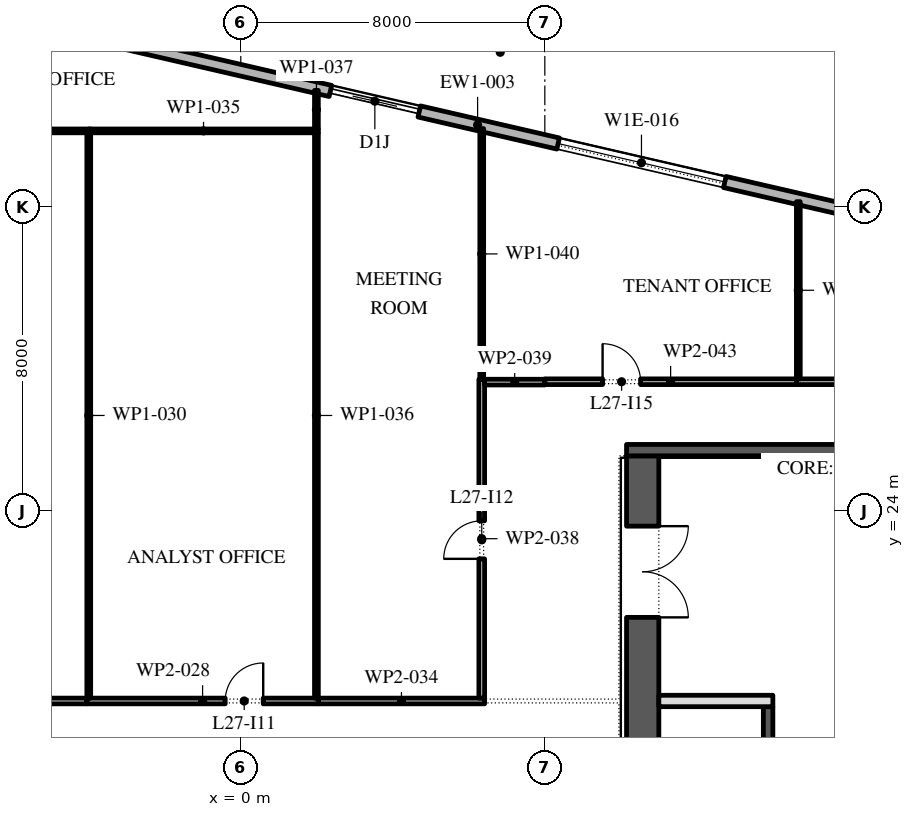
"""IFC4 building model, lengths in metres.
Left out: names, types, materials, properties, quantities, classifications, styles, units other than length and angle.
Written with IfcOpenShell. Run it as: python <this file> out.ifc"""

import sys

from ifc_helpers import new_model, si_unit, direction, frame, frame_2d, origin, place, context, subcontext, project, spatial, rectangle, extrude, element, fill, save


model = new_model("IFC4")
c1 = context("Model", 3, precision=1e-05, world=origin(), true_north=direction((0.0, 1.0)))
c2 = subcontext(c1, "Body", "Model", "MODEL_VIEW")
j1 = project(units=[si_unit("LENGTHUNIT", "METRE"), si_unit("PLANEANGLEUNIT", "RADIAN")], contexts=[c1])
p1 = place(None, origin())
s1 = spatial("IfcSite", under=j1, at=p1, CompositionType="ELEMENT")
p2 = place(p1, origin())
s2 = spatial("IfcBuilding", under=s1, at=p2, CompositionType="ELEMENT")
p3 = place(p2, frame((0.0, 0.0, 126.6)))
s3 = spatial("IfcBuildingStorey", under=s2, at=p3, CompositionType="ELEMENT", Elevation=126.6)
p4 = place(p3, frame((31.078, 28.421, 0.0), z_axis=(0.0, 0.0, 1.0), x_axis=(-0.974370456532, 0.224949357493, 0.0)))
e1 = element("IfcWall", 1, at=p4, inside=s3, PredefinedType="STANDARD", context=c2, shape_type="SweptSolid", body=[
    extrude(rectangle(XDim=51.0, YDim=0.3, at=frame_2d((25.5, 0.0))), origin(), (0.0, 0.0, 1.0), 4.0),
])
p5 = place(p4, frame((1.875, 0.0, 0.45)))
e2 = element("IfcOpeningElement", 2, at=p5, cuts=e1, PredefinedType="OPENING", context=c2, shape_type="SweptSolid", body=[
    extrude(rectangle(XDim=4.5, YDim=2.95, at=frame_2d((2.25, 1.475))), frame((0.0, 0.16, 0.0), z_axis=(0.0, -1.0, 0.0), x_axis=(1.0, 0.0, 0.0)), (0.0, 0.0, 1.0), 0.32),
])
p6 = place(p4, frame((10.275, 0.0, 0.45)))
e3 = element("IfcOpeningElement", 3, at=p6, cuts=e1, PredefinedType="OPENING", context=c2, shape_type="SweptSolid", body=[
    extrude(rectangle(XDim=4.5, YDim=2.875, at=frame_2d((2.25, 1.438))), frame((0.0, 0.16, 0.0), z_axis=(0.0, -1.0, 0.0), x_axis=(1.0, 0.0, 0.0)), (0.0, 0.0, 1.0), 0.32),
])
p7 = place(p4, frame((18.825, 0.0, 0.45)))
e4 = element("IfcOpeningElement", 4, at=p7, cuts=e1, PredefinedType="OPENING", context=c2, shape_type="SweptSolid", body=[
    extrude(rectangle(XDim=4.5, YDim=2.825, at=frame_2d((2.25, 1.413))), frame((0.0, 0.16, 0.0), z_axis=(0.0, -1.0, 0.0), x_axis=(1.0, 0.0, 0.0)), (0.0, 0.0, 1.0), 0.32),
])
p8 = place(p4, frame((27.075, 0.0, 0.0)))
e5 = element("IfcOpeningElement", 5, at=p8, cuts=e1, PredefinedType="OPENING", context=c2, shape_type="SweptSolid", body=[
    extrude(rectangle(XDim=2.4, YDim=3.125, at=frame_2d((1.2, 1.562))), frame((0.0, 0.16, 0.0), z_axis=(0.0, -1.0, 0.0), x_axis=(1.0, 0.0, 0.0)), (0.0, 0.0, 1.0), 0.32),
])
p9 = place(p4, frame((35.925, 0.0, 0.45)))
e6 = element("IfcOpeningElement", 6, at=p9, cuts=e1, PredefinedType="OPENING", context=c2, shape_type="SweptSolid", body=[
    extrude(rectangle(XDim=4.5, YDim=2.575, at=frame_2d((2.25, 1.288))), frame((0.0, 0.16, 0.0), z_axis=(0.0, -1.0, 0.0), x_axis=(1.0, 0.0, 0.0)), (0.0, 0.0, 1.0), 0.32),
])
p10 = place(p4, frame((44.475, 0.0, 0.45)))
e7 = element("IfcOpeningElement", 7, at=p10, cuts=e1, PredefinedType="OPENING", context=c2, shape_type="SweptSolid", body=[
    extrude(rectangle(XDim=4.5, YDim=3.05, at=frame_2d((2.25, 1.525))), frame((0.0, 0.16, 0.0), z_axis=(0.0, -1.0, 0.0), x_axis=(1.0, 0.0, 0.0)), (0.0, 0.0, 1.0), 0.32),
])
p11 = place(p3, frame((10.575, -2.45, 0.0), z_axis=(0.0, 0.0, 1.0), x_axis=(0.0, 1.0, 0.0)))
e8 = element("IfcWall", 8, at=p11, inside=s3, PredefinedType="SHEAR", context=c2, shape_type="SweptSolid", body=[
    extrude(rectangle(XDim=27.9, YDim=0.85, at=frame_2d((13.95, 0.0))), origin(), (0.0, 0.0, 1.0), 4.0),
])
p12 = place(p11, frame((23.65, 0.0, 0.0)))
e9 = element("IfcOpeningElement", 9, at=p12, cuts=e8, PredefinedType="OPENING", context=c2, shape_type="SweptSolid", body=[
    extrude(rectangle(XDim=2.4, YDim=2.1, at=frame_2d((1.2, 1.05))), frame((0.0, 0.435, 0.0), z_axis=(0.0, -1.0, 0.0), x_axis=(1.0, 0.0, 0.0)), (0.0, 0.0, 1.0), 0.87),
])
p13 = place(p11, frame((0.788, 0.0, 0.0)))
e10 = element("IfcOpeningElement", 10, at=p13, cuts=e8, PredefinedType="OPENING", context=c2, shape_type="SweptSolid", body=[
    extrude(rectangle(XDim=0.9, YDim=2.1, at=frame_2d((0.45, 1.05))), frame((0.0, 0.435, 0.0), z_axis=(0.0, -1.0, 0.0), x_axis=(1.0, 0.0, 0.0)), (0.0, 0.0, 1.0), 0.87),
])
p14 = place(p11, frame((3.962, 0.0, 0.0)))
e11 = element("IfcOpeningElement", 11, at=p14, cuts=e8, PredefinedType="OPENING", context=c2, shape_type="SweptSolid", body=[
    extrude(rectangle(XDim=1.0, YDim=2.1, at=frame_2d((0.5, 1.05))), frame((0.0, 0.435, 0.0), z_axis=(0.0, -1.0, 0.0), x_axis=(1.0, 0.0, 0.0)), (0.0, 0.0, 1.0), 0.87),
])
p15 = place(p3, frame((10.15, 25.6, 0.0), z_axis=(0.0, 0.0, 1.0), x_axis=(1.0, 0.0, 0.0)))
e12 = element("IfcWall", 12, at=p15, inside=s3, PredefinedType="SHEAR", context=c2, shape_type="SweptSolid", body=[
    extrude(rectangle(XDim=11.7, YDim=0.3, at=frame_2d((5.85, 0.0))), origin(), (0.0, 0.0, 1.0), 4.0),
])
p16 = place(p3, frame((13.875, -2.45, 0.0), z_axis=(0.0, 0.0, 1.0), x_axis=(0.0, 1.0, 0.0)))
e13 = element("IfcWall", 13, at=p16, inside=s3, PredefinedType="SHEAR", context=c2, shape_type="SweptSolid", body=[
    extrude(rectangle(XDim=21.3, YDim=0.25, at=frame_2d((10.65, 0.0))), origin(), (0.0, 0.0, 1.0), 4.0),
])
p17 = place(p16, frame((10.396, 0.0, 0.0)))
e14 = element("IfcOpeningElement", 14, at=p17, cuts=e13, PredefinedType="OPENING", context=c2, shape_type="SweptSolid", body=[
    extrude(rectangle(XDim=0.9, YDim=2.1, at=frame_2d((0.45, 1.05))), frame((0.0, 0.135, 0.0), z_axis=(0.0, -1.0, 0.0), x_axis=(1.0, 0.0, 0.0)), (0.0, 0.0, 1.0), 0.27),
])
p18 = place(p16, frame((14.6, 0.0, 0.0)))
e15 = element("IfcOpeningElement", 15, at=p18, cuts=e13, PredefinedType="OPENING", context=c2, shape_type="SweptSolid", body=[
    extrude(rectangle(XDim=0.9, YDim=2.1, at=frame_2d((0.45, 1.05))), frame((0.0, 0.135, 0.0), z_axis=(0.0, -1.0, 0.0), x_axis=(1.0, 0.0, 0.0)), (0.0, 0.0, 1.0), 0.27),
])
p19 = place(p16, frame((18.775, 0.0, 0.0)))
e16 = element("IfcOpeningElement", 16, at=p19, cuts=e13, PredefinedType="OPENING", context=c2, shape_type="SweptSolid", body=[
    extrude(rectangle(XDim=0.9, YDim=2.1, at=frame_2d((0.45, 1.05))), frame((0.0, 0.135, 0.0), z_axis=(0.0, -1.0, 0.0), x_axis=(1.0, 0.0, 0.0)), (0.0, 0.0, 1.0), 0.27),
])
p20 = place(p16, frame((6.971, 0.0, 0.0)))
e17 = element("IfcOpeningElement", 17, at=p20, cuts=e13, PredefinedType="OPENING", context=c2, shape_type="SweptSolid", body=[
    extrude(rectangle(XDim=1.1, YDim=2.1, at=frame_2d((0.55, 1.05))), frame((0.0, 0.135, 0.0), z_axis=(0.0, -1.0, 0.0), x_axis=(1.0, 0.0, 0.0)), (0.0, 0.0, 1.0), 0.27),
])
p21 = place(p3, frame((11.0, 19.0, 0.0), z_axis=(0.0, 0.0, 1.0), x_axis=(1.0, 0.0, 0.0)))
e18 = element("IfcWall", 18, at=p21, inside=s3, PredefinedType="PARTITIONING", context=c2, shape_type="SweptSolid", body=[
    extrude(rectangle(XDim=3.0, YDim=0.3, at=frame_2d((1.5, 0.0))), origin(), (0.0, 0.0, 1.0), 4.0),
])
p22 = place(p3, frame((-8.075, 19.0, 0.0), z_axis=(0.0, 0.0, 1.0), x_axis=(1.0, 0.0, 0.0)))
e19 = element("IfcWall", 19, at=p22, inside=s3, PredefinedType="PARTITIONING", context=c2, shape_type="SweptSolid", body=[
    extrude(rectangle(XDim=4.025, YDim=0.15, at=frame_2d((2.012, 0.0))), origin(), (0.0, 0.0, 1.0), 4.0),
])
p23 = place(p3, frame((-4.05, 19.0, 0.0), z_axis=(0.0, 0.0, 1.0), x_axis=(1.0, 0.0, 0.0)))
e20 = element("IfcWall", 20, at=p23, inside=s3, PredefinedType="PARTITIONING", context=c2, shape_type="SweptSolid", body=[
    extrude(rectangle(XDim=6.09, YDim=0.15, at=frame_2d((3.045, 0.0))), origin(), (0.0, 0.0, 1.0), 4.0),
])
p24 = place(p23, frame((3.64, 0.0, 0.0)))
e21 = element("IfcOpeningElement", 21, at=p24, cuts=e20, PredefinedType="OPENING", context=c2, shape_type="SweptSolid", body=[
    extrude(rectangle(XDim=1.0, YDim=2.1, at=frame_2d((0.5, 1.05))), frame((0.0, 0.085, 0.0), z_axis=(0.0, -1.0, 0.0), x_axis=(1.0, 0.0, 0.0)), (0.0, 0.0, 1.0), 0.17),
])
p25 = place(p3, frame((-3.95, 34.0, 0.0), z_axis=(0.0, 0.0, 1.0), x_axis=(-1.0, 0.0, 0.0)))
e22 = element("IfcWall", 22, at=p25, inside=s3, PredefinedType="PARTITIONING", context=c2, shape_type="SweptSolid", body=[
    extrude(rectangle(XDim=10.67, YDim=0.1, at=frame_2d((5.335, 0.0))), origin(), (0.0, 0.0, 1.0), 4.0),
])
p26 = place(p25, frame((7.0, 0.0, 0.0)))
e23 = element("IfcOpeningElement", 23, at=p26, cuts=e22, PredefinedType="OPENING", context=c2, shape_type="SweptSolid", body=[
    extrude(rectangle(XDim=0.9, YDim=2.1, at=frame_2d((0.45, 1.05))), frame((0.0, 0.06, 0.0), z_axis=(0.0, -1.0, 0.0), x_axis=(1.0, 0.0, 0.0)), (0.0, 0.0, 1.0), 0.12),
])
p27 = place(p3, frame((-4.0, 33.95, 0.0), z_axis=(0.0, 0.0, 1.0), x_axis=(0.0, -1.0, 0.0)))
e24 = element("IfcWall", 24, at=p27, inside=s3, PredefinedType="PARTITIONING", context=c2, shape_type="SweptSolid", body=[
    extrude(rectangle(XDim=14.875, YDim=0.1, at=frame_2d((7.438, 0.0))), origin(), (0.0, 0.0, 1.0), 4.0),
])
p28 = place(p3, frame((2.04, 19.0, 0.0), z_axis=(0.0, 0.0, 1.0), x_axis=(1.0, 0.0, 0.0)))
e25 = element("IfcWall", 25, at=p28, inside=s3, PredefinedType="PARTITIONING", context=c2, shape_type="SweptSolid", body=[
    extrude(rectangle(XDim=4.375, YDim=0.15, at=frame_2d((2.188, 0.0))), origin(), (0.0, 0.0, 1.0), 4.0),
])
p29 = place(p3, frame((2.04, 34.0, 0.0), z_axis=(0.0, 0.0, 1.0), x_axis=(-1.0, 0.0, 0.0)))
e26 = element("IfcWall", 26, at=p29, inside=s3, PredefinedType="PARTITIONING", context=c2, shape_type="SweptSolid", body=[
    extrude(rectangle(XDim=6.04, YDim=0.1, at=frame_2d((3.02, 0.0))), origin(), (0.0, 0.0, 1.0), 4.0),
])
p30 = place(p3, frame((1.99, 33.95, 0.0), z_axis=(0.0, 0.0, 1.0), x_axis=(0.0, -1.0, 0.0)))
e27 = element("IfcWall", 27, at=p30, inside=s3, PredefinedType="PARTITIONING", context=c2, shape_type="SweptSolid", body=[
    extrude(rectangle(XDim=14.875, YDim=0.1, at=frame_2d((7.438, 0.0))), origin(), (0.0, 0.0, 1.0), 4.0),
])
p31 = place(p3, frame((1.99, 35.065, 0.0), z_axis=(0.0, 0.0, 1.0), x_axis=(0.0, -1.0, 0.0)))
e28 = element("IfcWall", 28, at=p31, inside=s3, PredefinedType="PARTITIONING", context=c2, shape_type="SweptSolid", body=[
    extrude(rectangle(XDim=1.015, YDim=0.1, at=frame_2d((0.507, 0.0))), origin(), (0.0, 0.0, 1.0), 4.0),
])
p32 = place(p3, frame((6.34, 19.075, 0.0), z_axis=(0.0, 0.0, 1.0), x_axis=(0.0, 1.0, 0.0)))
e29 = element("IfcWall", 29, at=p32, inside=s3, PredefinedType="PARTITIONING", context=c2, shape_type="SweptSolid", body=[
    extrude(rectangle(XDim=8.39, YDim=0.15, at=frame_2d((4.195, 0.0))), origin(), (0.0, 0.0, 1.0), 4.0),
])
p33 = place(p32, frame((3.665, 0.0, 0.0)))
e30 = element("IfcOpeningElement", 30, at=p33, cuts=e29, PredefinedType="OPENING", context=c2, shape_type="SweptSolid", body=[
    extrude(rectangle(XDim=1.0, YDim=2.1, at=frame_2d((0.5, 1.05))), frame((0.0, 0.085, 0.0), z_axis=(0.0, -1.0, 0.0), x_axis=(1.0, 0.0, 0.0)), (0.0, 0.0, 1.0), 0.17),
])
p34 = place(p3, frame((6.415, 27.39, 0.0), z_axis=(0.0, 0.0, 1.0), x_axis=(1.0, 0.0, 0.0)))
e31 = element("IfcWall", 31, at=p34, inside=s3, PredefinedType="PARTITIONING", context=c2, shape_type="SweptSolid", body=[
    extrude(rectangle(XDim=1.585, YDim=0.15, at=frame_2d((0.792, 0.0))), origin(), (0.0, 0.0, 1.0), 4.0),
])
p35 = place(p3, frame((6.34, 34.061, 0.0), z_axis=(0.0, 0.0, 1.0), x_axis=(0.0, -1.0, 0.0)))
e32 = element("IfcWall", 32, at=p35, inside=s3, PredefinedType="PARTITIONING", context=c2, shape_type="SweptSolid", body=[
    extrude(rectangle(XDim=6.596, YDim=0.1, at=frame_2d((3.298, 0.0))), origin(), (0.0, 0.0, 1.0), 4.0),
])
p36 = place(p3, frame((8.0, 27.4, 0.0), z_axis=(0.0, 0.0, 1.0), x_axis=(1.0, 0.0, 0.0)))
e33 = element("IfcWall", 33, at=p36, inside=s3, PredefinedType="PARTITIONING", context=c2, shape_type="SweptSolid", body=[
    extrude(rectangle(XDim=6.62, YDim=0.15, at=frame_2d((3.31, 0.0))), origin(), (0.0, 0.0, 1.0), 4.0),
])
p37 = place(p36, frame((1.52, 0.0, 0.0)))
e34 = element("IfcOpeningElement", 34, at=p37, cuts=e33, PredefinedType="OPENING", context=c2, shape_type="SweptSolid", body=[
    extrude(rectangle(XDim=1.0, YDim=2.1, at=frame_2d((0.5, 1.05))), frame((0.0, 0.085, 0.0), z_axis=(0.0, -1.0, 0.0), x_axis=(1.0, 0.0, 0.0)), (0.0, 0.0, 1.0), 0.17),
])
p38 = place(p3, frame((14.62, 27.4, 0.0), z_axis=(0.0, 0.0, 1.0), x_axis=(1.0, 0.0, 0.0)))
e35 = element("IfcWall", 35, at=p38, inside=s3, PredefinedType="PARTITIONING", context=c2, shape_type="SweptSolid", body=[
    extrude(rectangle(XDim=8.44, YDim=0.15, at=frame_2d((4.22, 0.0))), origin(), (0.0, 0.0, 1.0), 4.0),
])
p39 = place(p38, frame((2.99, 0.0, 0.0)))
e36 = element("IfcOpeningElement", 36, at=p39, cuts=e35, PredefinedType="OPENING", context=c2, shape_type="SweptSolid", body=[
    extrude(rectangle(XDim=1.0, YDim=2.1, at=frame_2d((0.5, 1.05))), frame((0.0, 0.085, 0.0), z_axis=(0.0, -1.0, 0.0), x_axis=(1.0, 0.0, 0.0)), (0.0, 0.0, 1.0), 0.17),
])
p40 = place(p3, frame((14.67, 32.138, 0.0), z_axis=(0.0, 0.0, 1.0), x_axis=(0.0, -1.0, 0.0)))
e37 = element("IfcWall", 37, at=p40, inside=s3, PredefinedType="PARTITIONING", context=c2, shape_type="SweptSolid", body=[
    extrude(rectangle(XDim=4.663, YDim=0.1, at=frame_2d((2.332, 0.0))), origin(), (0.0, 0.0, 1.0), 4.0),
])
p41 = place(p7, origin())
e38 = element("IfcWindow", 38, at=p41, inside=s3, PartitioningType="DOUBLE_PANEL_VERTICAL", PredefinedType="WINDOW", context=c2, shape_type="SweptSolid", body=[
    extrude(rectangle(XDim=4.5, YDim=2.825, at=frame_2d((2.25, 1.413))), frame((0.0, 0.03, 0.0), z_axis=(0.0, -1.0, 0.0), x_axis=(1.0, 0.0, 0.0)), (0.0, 0.0, 1.0), 0.06),
])
fill(e4, e38)
p42 = place(p8, origin())
e39 = element("IfcDoor", 39, at=p42, inside=s3, OperationType="DOUBLE_DOOR_SLIDING", PredefinedType="DOOR", context=c2, shape_type="SweptSolid", body=[
    extrude(rectangle(XDim=2.4, YDim=3.125, at=frame_2d((1.2, 1.562))), frame((0.0, 0.025, 0.0), z_axis=(0.0, -1.0, 0.0), x_axis=(1.0, 0.0, 0.0)), (0.0, 0.0, 1.0), 0.05),
])
fill(e5, e39)
p43 = place(p12, frame((2.4, 0.0, 0.0), z_axis=(0.0, 0.0, 1.0), x_axis=(-1.0, 0.0, 0.0)))
e40 = element("IfcDoor", 40, at=p43, inside=s3, OperationType="DOUBLE_DOOR_SINGLE_SWING", PredefinedType="DOOR", context=c2, shape_type="SweptSolid", body=[
    extrude(rectangle(XDim=2.4, YDim=2.1, at=frame_2d((1.2, 1.05))), frame((0.0, 0.025, 0.0), z_axis=(0.0, -1.0, 0.0), x_axis=(1.0, 0.0, 0.0)), (0.0, 0.0, 1.0), 0.05),
])
fill(e9, e40)
p44 = place(p24, origin())
e41 = element("IfcDoor", 41, at=p44, inside=s3, OperationType="SINGLE_SWING_LEFT", PredefinedType="DOOR", context=c2, shape_type="SweptSolid", body=[
    extrude(rectangle(XDim=1.0, YDim=2.1, at=frame_2d((0.5, 1.05))), frame((0.0, 0.025, 0.0), z_axis=(0.0, -1.0, 0.0), x_axis=(1.0, 0.0, 0.0)), (0.0, 0.0, 1.0), 0.05),
])
fill(e21, e41)
p45 = place(p33, origin())
e42 = element("IfcDoor", 42, at=p45, inside=s3, OperationType="SINGLE_SWING_RIGHT", PredefinedType="DOOR", context=c2, shape_type="SweptSolid", body=[
    extrude(rectangle(XDim=1.0, YDim=2.1, at=frame_2d((0.5, 1.05))), frame((0.0, 0.025, 0.0), z_axis=(0.0, -1.0, 0.0), x_axis=(1.0, 0.0, 0.0)), (0.0, 0.0, 1.0), 0.05),
])
fill(e30, e42)
p46 = place(p37, origin())
e43 = element("IfcDoor", 43, at=p46, inside=s3, OperationType="SINGLE_SWING_RIGHT", PredefinedType="DOOR", context=c2, shape_type="SweptSolid", body=[
    extrude(rectangle(XDim=1.0, YDim=2.1, at=frame_2d((0.5, 1.05))), frame((0.0, 0.025, 0.0), z_axis=(0.0, -1.0, 0.0), x_axis=(1.0, 0.0, 0.0)), (0.0, 0.0, 1.0), 0.05),
])
fill(e34, e43)
save(model, sys.argv[1])
